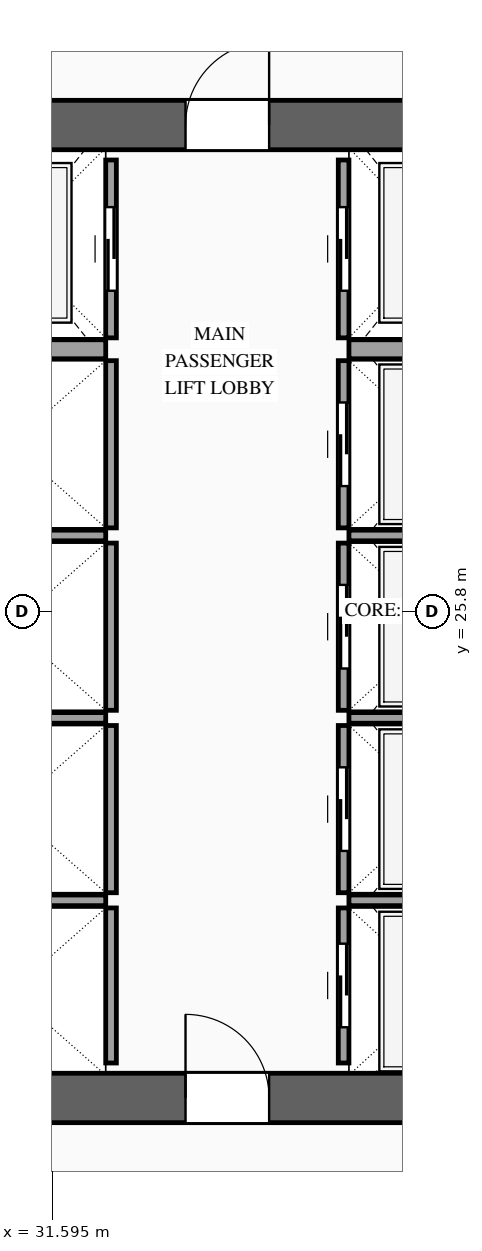
"""IFC4 building model, lengths in metres.
Left out: names, types, materials, properties, quantities, classifications, styles, units other than length and angle.
Written with IfcOpenShell. Run it as: python <this file> out.ifc"""

import sys

from ifc_helpers import new_model, si_unit, direction, frame, frame_2d, origin, place, context, subcontext, project, spatial, rectangle, extrude, source, transform, mapped, element, fill, save


model = new_model("IFC4")
c1 = context("Model", 3, precision=1e-05, world=origin(), true_north=direction((0.0, 1.0)))
c2 = subcontext(c1, "Body", "Model", "MODEL_VIEW")
j1 = project(units=[si_unit("LENGTHUNIT", "METRE"), si_unit("PLANEANGLEUNIT", "RADIAN")], contexts=[c1])
p1 = place(None, origin())
s1 = spatial("IfcSite", under=j1, at=p1, CompositionType="ELEMENT")
p2 = place(p1, origin())
s2 = spatial("IfcBuilding", under=s1, at=p2, CompositionType="ELEMENT")
p3 = place(p2, frame((0.0, 0.0, 171.6)))
s3 = spatial("IfcBuildingStorey", under=s2, at=p3, CompositionType="ELEMENT", Elevation=171.6)
p4 = place(p3, frame((23.475, 19.4, 0.0), z_axis=(0.0, 0.0, 1.0), x_axis=(1.0, 0.0, 0.0)))
e1 = element("IfcWall", 1, at=p4, inside=s3, PredefinedType="SHEAR", context=c2, shape_type="SweptSolid", body=[
    extrude(rectangle(XDim=27.05, YDim=0.65, at=frame_2d((13.525, 0.0))), origin(), (0.0, 0.0, 1.0), 4.8),
])
p5 = place(p4, frame((1.975, 0.0, 0.0)))
e2 = element("IfcOpeningElement", 2, at=p5, cuts=e1, PredefinedType="OPENING", context=c2, shape_type="SweptSolid", body=[
    extrude(rectangle(XDim=1.1, YDim=2.2, at=frame_2d((0.55, 1.1))), frame((0.0, 0.34, 0.0), z_axis=(0.0, -1.0, 0.0), x_axis=(1.0, 0.0, 0.0)), (0.0, 0.0, 1.0), 0.68),
])
p6 = place(p4, frame((9.875, 0.0, 0.0)))
e3 = element("IfcOpeningElement", 3, at=p6, cuts=e1, PredefinedType="OPENING", context=c2, shape_type="SweptSolid", body=[
    extrude(rectangle(XDim=1.1, YDim=2.2, at=frame_2d((0.55, 1.1))), frame((0.0, 0.34, 0.0), z_axis=(0.0, -1.0, 0.0), x_axis=(1.0, 0.0, 0.0)), (0.0, 0.0, 1.0), 0.68),
])
p7 = place(p4, frame((23.075, 0.0, 0.0)))
e4 = element("IfcOpeningElement", 4, at=p7, cuts=e1, PredefinedType="OPENING", context=c2, shape_type="SweptSolid", body=[
    extrude(rectangle(XDim=1.1, YDim=2.2, at=frame_2d((0.55, 1.1))), frame((0.0, 0.34, 0.0), z_axis=(0.0, -1.0, 0.0), x_axis=(1.0, 0.0, 0.0)), (0.0, 0.0, 1.0), 0.68),
])
p8 = place(p4, frame((19.695, 0.0, 0.0)))
e5 = element("IfcOpeningElement", 5, at=p8, cuts=e1, PredefinedType="OPENING", context=c2, shape_type="SweptSolid", body=[
    extrude(rectangle(XDim=0.9, YDim=2.15, at=frame_2d((0.45, 1.075))), frame((0.0, 0.34, 0.0), z_axis=(0.0, -1.0, 0.0), x_axis=(1.0, 0.0, 0.0)), (0.0, 0.0, 1.0), 0.68),
])
p9 = place(p4, frame((18.255, 0.0, 0.0)))
e6 = element("IfcOpeningElement", 6, at=p9, cuts=e1, PredefinedType="OPENING", context=c2, shape_type="SweptSolid", body=[
    extrude(rectangle(XDim=0.9, YDim=2.15, at=frame_2d((0.45, 1.075))), frame((0.0, 0.34, 0.0), z_axis=(0.0, -1.0, 0.0), x_axis=(1.0, 0.0, 0.0)), (0.0, 0.0, 1.0), 0.68),
])
p10 = place(p3, frame((23.475, 32.2, 0.0), z_axis=(0.0, 0.0, 1.0), x_axis=(1.0, 0.0, 0.0)))
e7 = element("IfcWall", 7, at=p10, inside=s3, PredefinedType="SHEAR", context=c2, shape_type="SweptSolid", body=[
    extrude(rectangle(XDim=27.05, YDim=0.65, at=frame_2d((13.525, 0.0))), origin(), (0.0, 0.0, 1.0), 4.8),
])
p11 = place(p10, frame((4.595, 0.0, 0.0)))
e8 = element("IfcOpeningElement", 8, at=p11, cuts=e7, PredefinedType="OPENING", context=c2, shape_type="SweptSolid", body=[
    extrude(rectangle(XDim=0.9, YDim=2.15, at=frame_2d((0.45, 1.075))), frame((0.0, 0.34, 0.0), z_axis=(0.0, -1.0, 0.0), x_axis=(1.0, 0.0, 0.0)), (0.0, 0.0, 1.0), 0.68),
])
p12 = place(p10, frame((9.875, 0.0, 0.0)))
e9 = element("IfcOpeningElement", 9, at=p12, cuts=e7, PredefinedType="OPENING", context=c2, shape_type="SweptSolid", body=[
    extrude(rectangle(XDim=1.1, YDim=2.2, at=frame_2d((0.55, 1.1))), frame((0.0, 0.34, 0.0), z_axis=(0.0, -1.0, 0.0), x_axis=(1.0, 0.0, 0.0)), (0.0, 0.0, 1.0), 0.68),
])
p13 = place(p10, frame((15.725, 0.0, 0.0)))
e10 = element("IfcOpeningElement", 10, at=p13, cuts=e7, PredefinedType="OPENING", context=c2, shape_type="SweptSolid", body=[
    extrude(rectangle(XDim=1.1, YDim=2.2, at=frame_2d((0.55, 1.1))), frame((0.0, 0.34, 0.0), z_axis=(0.0, -1.0, 0.0), x_axis=(1.0, 0.0, 0.0)), (0.0, 0.0, 1.0), 0.68),
])
m1 = source(origin(), c2, "Body", "SweptSolid", [
    extrude(rectangle(XDim=2.04, YDim=0.14, at=frame_2d((1.02, 0.0))), origin(), (0.0, 0.0, 1.0), 4.52),
])
p14 = place(p3, frame((32.37, 19.86, 0.0), z_axis=(0.0, 0.0, 1.0), x_axis=(0.0, 1.0, 0.0)))
e11 = element("IfcWall", 11, at=p14, inside=s3, PredefinedType="SOLIDWALL", context=c2, shape_type="MappedRepresentation", body=[
    mapped(m1, transform((0.0, 0.0, 0.0), scale=1.0)),
])
m2 = source(origin(), c2, "Body", "SweptSolid", [
    extrude(rectangle(XDim=2.5, YDim=0.14, at=frame_2d((1.25, 0.0))), origin(), (0.0, 0.0, 1.0), 4.52),
])
p15 = place(p3, frame((29.8, 22.0, 0.0), z_axis=(0.0, 0.0, 1.0), x_axis=(1.0, 0.0, 0.0)))
e12 = element("IfcWall", 12, at=p15, inside=s3, PredefinedType="SOLIDWALL", context=c2, shape_type="MappedRepresentation", body=[
    mapped(m2, transform((0.0, 0.0, 0.0), scale=1.0)),
])
m3 = source(origin(), c2, "Body", "SweptSolid", [
    extrude(rectangle(XDim=2.2, YDim=0.14, at=frame_2d((1.1, 0.0))), origin(), (0.0, 0.0, 1.0), 4.52),
])
p16 = place(p3, frame((32.37, 22.1, 0.0), z_axis=(0.0, 0.0, 1.0), x_axis=(0.0, 1.0, 0.0)))
e13 = element("IfcWall", 13, at=p16, inside=s3, PredefinedType="SOLIDWALL", context=c2, shape_type="MappedRepresentation", body=[
    mapped(m3, transform((0.0, 0.0, 0.0), scale=1.0)),
])
p17 = place(p3, frame((29.8, 24.4, 0.0), z_axis=(0.0, 0.0, 1.0), x_axis=(1.0, 0.0, 0.0)))
e14 = element("IfcWall", 14, at=p17, inside=s3, PredefinedType="SOLIDWALL", context=c2, shape_type="MappedRepresentation", body=[
    mapped(m2, transform((0.0, 0.0, 0.0), scale=1.0)),
])
p18 = place(p3, frame((32.37, 24.5, 0.0), z_axis=(0.0, 0.0, 1.0), x_axis=(0.0, 1.0, 0.0)))
e15 = element("IfcWall", 15, at=p18, inside=s3, PredefinedType="SOLIDWALL", context=c2, shape_type="MappedRepresentation", body=[
    mapped(m3, transform((0.0, 0.0, 0.0), scale=1.0)),
])
p19 = place(p3, frame((29.8, 26.8, 0.0), z_axis=(0.0, 0.0, 1.0), x_axis=(1.0, 0.0, 0.0)))
e16 = element("IfcWall", 16, at=p19, inside=s3, PredefinedType="SOLIDWALL", context=c2, shape_type="MappedRepresentation", body=[
    mapped(m2, transform((0.0, 0.0, 0.0), scale=1.0)),
])
m4 = source(origin(), c2, "Body", "SweptSolid", [
    extrude(rectangle(XDim=2.2, YDim=0.14, at=frame_2d((1.1, 0.0))), origin(), (0.0, 0.0, 1.0), 4.52),
])
p20 = place(p3, frame((32.37, 26.9, 0.0), z_axis=(0.0, 0.0, 1.0), x_axis=(0.0, 1.0, 0.0)))
e17 = element("IfcWall", 17, at=p20, inside=s3, PredefinedType="SOLIDWALL", context=c2, shape_type="MappedRepresentation", body=[
    mapped(m4, transform((0.0, 0.0, 0.0), scale=1.0)),
])
p21 = place(p3, frame((32.37, 29.4, 0.0), z_axis=(0.0, 0.0, 1.0), x_axis=(0.0, 1.0, 0.0)))
e18 = element("IfcWall", 18, at=p21, inside=s3, PredefinedType="SOLIDWALL", context=c2, shape_type="SweptSolid", body=[
    extrude(rectangle(XDim=2.34, YDim=0.14, at=frame_2d((1.17, 0.0))), origin(), (0.0, 0.0, 1.0), 4.52),
])
p22 = place(p21, frame((0.62, 0.0, 0.0)))
e19 = element("IfcOpeningElement", 19, at=p22, cuts=e18, PredefinedType="OPENING", context=c2, shape_type="SweptSolid", body=[
    extrude(rectangle(XDim=1.1, YDim=2.2, at=frame_2d((0.55, 1.1))), frame((0.0, 0.085, 0.0), z_axis=(0.0, -1.0, 0.0), x_axis=(1.0, 0.0, 0.0)), (0.0, 0.0, 1.0), 0.17),
])
m5 = source(origin(), c2, "Body", "SweptSolid", [
    extrude(rectangle(XDim=2.5, YDim=0.25, at=frame_2d((1.25, 0.0))), origin(), (0.0, 0.0, 1.0), 4.52),
])
p23 = place(p3, frame((29.8, 29.25, 0.0), z_axis=(0.0, 0.0, 1.0), x_axis=(1.0, 0.0, 0.0)))
e20 = element("IfcWall", 20, at=p23, inside=s3, PredefinedType="SOLIDWALL", context=c2, shape_type="MappedRepresentation", body=[
    mapped(m5, transform((0.0, 0.0, 0.0), scale=1.0)),
])
p24 = place(p3, frame((35.43, 19.86, 0.0), z_axis=(0.0, 0.0, 1.0), x_axis=(0.0, 1.0, 0.0)))
e21 = element("IfcWall", 21, at=p24, inside=s3, PredefinedType="SOLIDWALL", context=c2, shape_type="SweptSolid", body=[
    extrude(rectangle(XDim=2.04, YDim=0.14, at=frame_2d((1.02, 0.0))), origin(), (0.0, 0.0, 1.0), 4.52),
])
p25 = place(p24, frame((0.47, 0.0, 0.0)))
e22 = element("IfcOpeningElement", 22, at=p25, cuts=e21, PredefinedType="OPENING", context=c2, shape_type="SweptSolid", body=[
    extrude(rectangle(XDim=1.1, YDim=2.2, at=frame_2d((0.55, 1.1))), frame((0.0, 0.085, 0.0), z_axis=(0.0, -1.0, 0.0), x_axis=(1.0, 0.0, 0.0)), (0.0, 0.0, 1.0), 0.17),
])
m6 = source(origin(), c2, "Body", "SweptSolid", [
    extrude(rectangle(XDim=2.4, YDim=0.14, at=frame_2d((1.2, 0.0))), origin(), (0.0, 0.0, 1.0), 4.52),
])
p26 = place(p3, frame((35.5, 22.0, 0.0), z_axis=(0.0, 0.0, 1.0), x_axis=(1.0, 0.0, 0.0)))
e23 = element("IfcWall", 23, at=p26, inside=s3, PredefinedType="SOLIDWALL", context=c2, shape_type="MappedRepresentation", body=[
    mapped(m6, transform((0.0, 0.0, 0.0), scale=1.0)),
])
p27 = place(p3, frame((35.43, 22.1, 0.0), z_axis=(0.0, 0.0, 1.0), x_axis=(0.0, 1.0, 0.0)))
e24 = element("IfcWall", 24, at=p27, inside=s3, PredefinedType="SOLIDWALL", context=c2, shape_type="SweptSolid", body=[
    extrude(rectangle(XDim=2.2, YDim=0.14, at=frame_2d((1.1, 0.0))), origin(), (0.0, 0.0, 1.0), 4.52),
])
p28 = place(p27, frame((0.55, 0.0, 0.0)))
e25 = element("IfcOpeningElement", 25, at=p28, cuts=e24, PredefinedType="OPENING", context=c2, shape_type="SweptSolid", body=[
    extrude(rectangle(XDim=1.1, YDim=2.2, at=frame_2d((0.55, 1.1))), frame((0.0, 0.085, 0.0), z_axis=(0.0, -1.0, 0.0), x_axis=(1.0, 0.0, 0.0)), (0.0, 0.0, 1.0), 0.17),
])
p29 = place(p3, frame((35.5, 24.4, 0.0), z_axis=(0.0, 0.0, 1.0), x_axis=(1.0, 0.0, 0.0)))
e26 = element("IfcWall", 26, at=p29, inside=s3, PredefinedType="SOLIDWALL", context=c2, shape_type="MappedRepresentation", body=[
    mapped(m6, transform((0.0, 0.0, 0.0), scale=1.0)),
])
p30 = place(p3, frame((35.43, 24.5, 0.0), z_axis=(0.0, 0.0, 1.0), x_axis=(0.0, 1.0, 0.0)))
e27 = element("IfcWall", 27, at=p30, inside=s3, PredefinedType="SOLIDWALL", context=c2, shape_type="SweptSolid", body=[
    extrude(rectangle(XDim=2.2, YDim=0.14, at=frame_2d((1.1, 0.0))), origin(), (0.0, 0.0, 1.0), 4.52),
])
p31 = place(p30, frame((0.55, 0.0, 0.0)))
e28 = element("IfcOpeningElement", 28, at=p31, cuts=e27, PredefinedType="OPENING", context=c2, shape_type="SweptSolid", body=[
    extrude(rectangle(XDim=1.1, YDim=2.2, at=frame_2d((0.55, 1.1))), frame((0.0, 0.085, 0.0), z_axis=(0.0, -1.0, 0.0), x_axis=(1.0, 0.0, 0.0)), (0.0, 0.0, 1.0), 0.17),
])
p32 = place(p3, frame((35.5, 26.8, 0.0), z_axis=(0.0, 0.0, 1.0), x_axis=(1.0, 0.0, 0.0)))
e29 = element("IfcWall", 29, at=p32, inside=s3, PredefinedType="SOLIDWALL", context=c2, shape_type="MappedRepresentation", body=[
    mapped(m6, transform((0.0, 0.0, 0.0), scale=1.0)),
])
p33 = place(p3, frame((35.43, 26.9, 0.0), z_axis=(0.0, 0.0, 1.0), x_axis=(0.0, 1.0, 0.0)))
e30 = element("IfcWall", 30, at=p33, inside=s3, PredefinedType="SOLIDWALL", context=c2, shape_type="SweptSolid", body=[
    extrude(rectangle(XDim=2.2, YDim=0.14, at=frame_2d((1.1, 0.0))), origin(), (0.0, 0.0, 1.0), 4.52),
])
p34 = place(p33, frame((0.55, 0.0, 0.0)))
e31 = element("IfcOpeningElement", 31, at=p34, cuts=e30, PredefinedType="OPENING", context=c2, shape_type="SweptSolid", body=[
    extrude(rectangle(XDim=1.1, YDim=2.2, at=frame_2d((0.55, 1.1))), frame((0.0, 0.085, 0.0), z_axis=(0.0, -1.0, 0.0), x_axis=(1.0, 0.0, 0.0)), (0.0, 0.0, 1.0), 0.17),
])
p35 = place(p3, frame((35.43, 29.4, 0.0), z_axis=(0.0, 0.0, 1.0), x_axis=(0.0, 1.0, 0.0)))
e32 = element("IfcWall", 32, at=p35, inside=s3, PredefinedType="SOLIDWALL", context=c2, shape_type="SweptSolid", body=[
    extrude(rectangle(XDim=2.34, YDim=0.14, at=frame_2d((1.17, 0.0))), origin(), (0.0, 0.0, 1.0), 4.52),
])
p36 = place(p35, frame((0.62, 0.0, 0.0)))
e33 = element("IfcOpeningElement", 33, at=p36, cuts=e32, PredefinedType="OPENING", context=c2, shape_type="SweptSolid", body=[
    extrude(rectangle(XDim=1.1, YDim=2.2, at=frame_2d((0.55, 1.1))), frame((0.0, 0.085, 0.0), z_axis=(0.0, -1.0, 0.0), x_axis=(1.0, 0.0, 0.0)), (0.0, 0.0, 1.0), 0.17),
])
m7 = source(origin(), c2, "Body", "SweptSolid", [
    extrude(rectangle(XDim=2.4, YDim=0.25, at=frame_2d((1.2, 0.0))), origin(), (0.0, 0.0, 1.0), 4.52),
])
p37 = place(p3, frame((35.5, 29.25, 0.0), z_axis=(0.0, 0.0, 1.0), x_axis=(1.0, 0.0, 0.0)))
e34 = element("IfcWall", 34, at=p37, inside=s3, PredefinedType="SOLIDWALL", context=c2, shape_type="MappedRepresentation", body=[
    mapped(m7, transform((0.0, 0.0, 0.0), scale=1.0)),
])
m8 = source(origin(), c2, "Body", "SweptSolid", [
    extrude(rectangle(XDim=1.1, YDim=2.2, at=frame_2d((0.55, 1.1))), frame((0.0, 0.025, 0.0), z_axis=(0.0, -1.0, 0.0), x_axis=(1.0, 0.0, 0.0)), (0.0, 0.0, 1.0), 0.05),
])
p38 = place(p22, origin())
e35 = element("IfcDoor", 35, at=p38, inside=s3, OperationType="SLIDING_TO_LEFT", PredefinedType="DOOR", context=c2, shape_type="MappedRepresentation", body=[
    mapped(m8, transform((0.0, 0.0, 0.0), scale=1.0)),
])
fill(e19, e35)
p39 = place(p25, origin())
e36 = element("IfcDoor", 36, at=p39, inside=s3, OperationType="SLIDING_TO_RIGHT", PredefinedType="DOOR", context=c2, shape_type="MappedRepresentation", body=[
    mapped(m8, transform((0.0, 0.0, 0.0), scale=1.0)),
])
fill(e22, e36)
p40 = place(p28, origin())
e37 = element("IfcDoor", 37, at=p40, inside=s3, OperationType="SLIDING_TO_LEFT", PredefinedType="DOOR", context=c2, shape_type="MappedRepresentation", body=[
    mapped(m8, transform((0.0, 0.0, 0.0), scale=1.0)),
])
fill(e25, e37)
p41 = place(p31, origin())
e38 = element("IfcDoor", 38, at=p41, inside=s3, OperationType="SLIDING_TO_RIGHT", PredefinedType="DOOR", context=c2, shape_type="MappedRepresentation", body=[
    mapped(m8, transform((0.0, 0.0, 0.0), scale=1.0)),
])
fill(e28, e38)
p42 = place(p34, origin())
e39 = element("IfcDoor", 39, at=p42, inside=s3, OperationType="SLIDING_TO_LEFT", PredefinedType="DOOR", context=c2, shape_type="MappedRepresentation", body=[
    mapped(m8, transform((0.0, 0.0, 0.0), scale=1.0)),
])
fill(e31, e39)
p43 = place(p36, origin())
e40 = element("IfcDoor", 40, at=p43, inside=s3, OperationType="SLIDING_TO_RIGHT", PredefinedType="DOOR", context=c2, shape_type="MappedRepresentation", body=[
    mapped(m8, transform((0.0, 0.0, 0.0), scale=1.0)),
])
fill(e33, e40)
m9 = source(origin(), c2, "Body", "SweptSolid", [
    extrude(rectangle(XDim=1.1, YDim=2.2, at=frame_2d((0.55, 1.1))), frame((0.0, 0.025, 0.0), z_axis=(0.0, -1.0, 0.0), x_axis=(1.0, 0.0, 0.0)), (0.0, 0.0, 1.0), 0.05),
])
p44 = place(p6, origin())
e41 = element("IfcDoor", 41, at=p44, inside=s3, OperationType="SINGLE_SWING_LEFT", PredefinedType="DOOR", context=c2, shape_type="MappedRepresentation", body=[
    mapped(m9, transform((0.0, 0.0, 0.0), scale=1.0)),
])
fill(e3, e41)
p45 = place(p12, origin())
e42 = element("IfcDoor", 42, at=p45, inside=s3, OperationType="SINGLE_SWING_RIGHT", PredefinedType="DOOR", context=c2, shape_type="MappedRepresentation", body=[
    mapped(m9, transform((0.0, 0.0, 0.0), scale=1.0)),
])
fill(e9, e42)
save(model, sys.argv[1])
